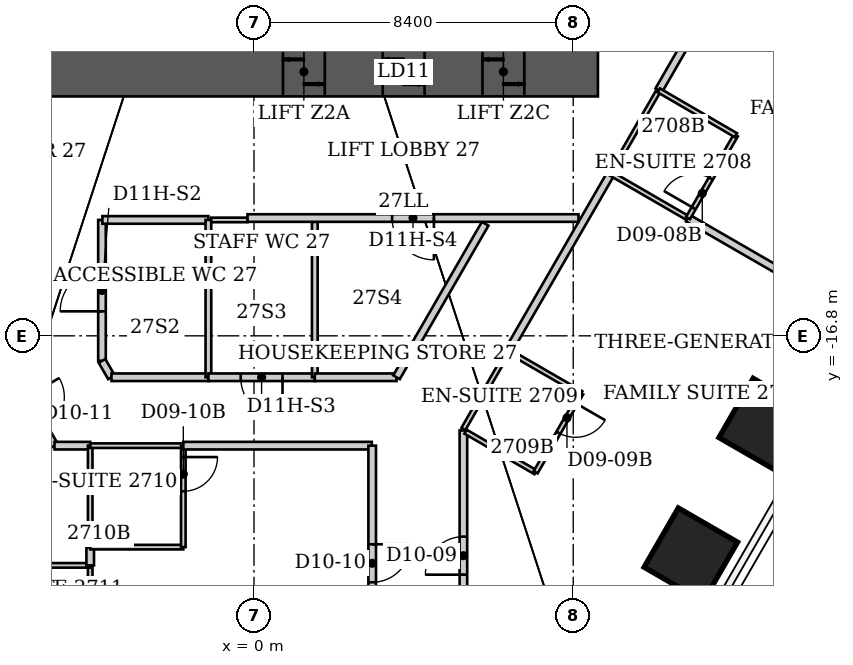
"""IFC4 building model, lengths in metres.
Left out: names, types, materials, properties, quantities, classifications, styles, units other than length and angle.
Written with IfcOpenShell. Run it as: python <this file> out.ifc"""

import sys

from ifc_helpers import new_model, si_unit, direction, frame, frame_2d, origin, origin_2d, place, context, subcontext, project, spatial, rectangle, extrude, element, fill, save


model = new_model("IFC4")
c1 = context("Model", 3, precision=1e-05, world=origin(), true_north=direction((0.0, 1.0)))
c2 = subcontext(c1, "Body", "Model", "MODEL_VIEW")
j1 = project(units=[si_unit("LENGTHUNIT", "METRE"), si_unit("PLANEANGLEUNIT", "RADIAN")], contexts=[c1])
p1 = place(None, origin())
s1 = spatial("IfcSite", under=j1, at=p1, CompositionType="ELEMENT")
p2 = place(p1, origin())
s2 = spatial("IfcBuilding", under=s1, at=p2, CompositionType="ELEMENT")
p3 = place(p2, frame((0.0, 0.0, 112.0)))
s3 = spatial("IfcBuildingStorey", under=s2, at=p3, CompositionType="ELEMENT", Elevation=112.0)
for number, where, z_axis, x_axis in (
    (1, (13.464, -19.147, 0.0), (0.0, 0.0, 1.0), (0.866, -0.5, 0.0)),
    (2, (11.494, -22.559, 0.0), (0.0, 0.0, 1.0), (0.866, -0.5, 0.0)),
):
    element("IfcColumn", number, at=place(p3, frame(where, z_axis=z_axis, x_axis=x_axis)), inside=s3, PredefinedType="COLUMN", context=c2, shape_type="SweptSolid", body=[
        extrude(rectangle(XDim=1.8, YDim=1.8, at=origin_2d()), origin(), (0.0, 0.0, 1.0), 3.8),
    ])
p4 = place(p3, frame((-9.05, -9.85, 0.0), z_axis=(0.0, 0.0, 1.0), x_axis=(1.0, 0.0, 0.0)))
e3 = element("IfcWall", 3, at=p4, inside=s3, PredefinedType="SHEAR", context=c2, shape_type="SweptSolid", body=[
    extrude(rectangle(XDim=18.1, YDim=1.3, at=frame_2d((9.05, 0.0))), origin(), (0.0, 0.0, 1.0), 3.8),
])
p5 = place(p4, frame((1.938, 0.0, 0.0)))
e4 = element("IfcOpeningElement", 4, at=p5, cuts=e3, PredefinedType="OPENING", context=c2, shape_type="SweptSolid", body=[
    extrude(rectangle(XDim=1.1, YDim=2.2, at=frame_2d((0.55, 1.1))), frame((0.0, 0.65, 0.0), z_axis=(0.0, -1.0, 0.0), x_axis=(1.0, 0.0, 0.0)), (0.0, 0.0, 1.0), 1.3),
])
p6 = place(p4, frame((9.812, 0.0, 0.0)))
e5 = element("IfcOpeningElement", 5, at=p6, cuts=e3, PredefinedType="OPENING", context=c2, shape_type="SweptSolid", body=[
    extrude(rectangle(XDim=1.1, YDim=2.1, at=frame_2d((0.55, 1.05))), frame((0.0, 0.65, 0.0), z_axis=(0.0, -1.0, 0.0), x_axis=(1.0, 0.0, 0.0)), (0.0, 0.0, 1.0), 1.3),
])
p7 = place(p4, frame((12.438, 0.0, 0.0)))
e6 = element("IfcOpeningElement", 6, at=p7, cuts=e3, PredefinedType="OPENING", context=c2, shape_type="SweptSolid", body=[
    extrude(rectangle(XDim=1.1, YDim=2.1, at=frame_2d((0.55, 1.05))), frame((0.0, 0.65, 0.0), z_axis=(0.0, -1.0, 0.0), x_axis=(1.0, 0.0, 0.0)), (0.0, 0.0, 1.0), 1.3),
])
p8 = place(p4, frame((15.062, 0.0, 0.0)))
e7 = element("IfcOpeningElement", 7, at=p8, cuts=e3, PredefinedType="OPENING", context=c2, shape_type="SweptSolid", body=[
    extrude(rectangle(XDim=1.1, YDim=2.1, at=frame_2d((0.55, 1.05))), frame((0.0, 0.65, 0.0), z_axis=(0.0, -1.0, 0.0), x_axis=(1.0, 0.0, 0.0)), (0.0, 0.0, 1.0), 1.3),
])
p9 = place(p3, frame((-6.23, -18.0, 0.0), z_axis=(0.0, 0.0, 1.0), x_axis=(0.501647016168, -0.86507240805, 0.0)))
e8 = element("IfcWall", 8, at=p9, inside=s3, PredefinedType="PARTITIONING", context=c2, shape_type="SweptSolid", body=[
    extrude(rectangle(XDim=1.954, YDim=0.2, at=frame_2d((0.977, 0.0))), origin(), (0.0, 0.0, 1.0), 3.64),
])
p10 = place(p9, frame((0.477, 0.0, 0.0)))
e9 = element("IfcOpeningElement", 9, at=p10, cuts=e8, PredefinedType="OPENING", context=c2, shape_type="SweptSolid", body=[
    extrude(rectangle(XDim=1.0, YDim=2.13, at=frame_2d((0.5, 1.065))), frame((0.0, 0.1, 0.0), z_axis=(0.0, -1.0, 0.0), x_axis=(1.0, 0.0, 0.0)), (0.0, 0.0, 1.0), 0.2),
])
p11 = place(p3, frame((-5.25, -19.69, 0.0), z_axis=(0.0, 0.0, 1.0), x_axis=(1.0, 0.0, 0.0)))
e10 = element("IfcWall", 10, at=p11, inside=s3, PredefinedType="PARTITIONING", context=c2, shape_type="SweptSolid", body=[
    extrude(rectangle(XDim=0.94, YDim=0.2, at=frame_2d((0.47, 0.0))), origin(), (0.0, 0.0, 1.0), 3.64),
])
p12 = place(p3, frame((-4.31, -24.84, 0.0), z_axis=(0.0, 0.0, 1.0), x_axis=(0.0, 1.0, 0.0)))
e11 = element("IfcWall", 11, at=p12, inside=s3, PredefinedType="PARTITIONING", context=c2, shape_type="SweptSolid", body=[
    extrude(rectangle(XDim=2.0, YDim=0.12, at=frame_2d((1.0, 0.0))), origin(), (0.0, 0.0, 1.0), 3.64),
])
p13 = place(p3, frame((-4.31, -22.84, 0.0), z_axis=(0.0, 0.0, 1.0), x_axis=(-1.0, 0.0, 0.0)))
e12 = element("IfcWall", 12, at=p13, inside=s3, PredefinedType="PARTITIONING", context=c2, shape_type="SweptSolid", body=[
    extrude(rectangle(XDim=2.4, YDim=0.12, at=frame_2d((1.2, 0.0))), origin(), (0.0, 0.0, 1.0), 3.64),
])
p14 = place(p3, frame((-4.31, -22.84, 0.0), z_axis=(0.0, 0.0, 1.0), x_axis=(0.0, 1.0, 0.0)))
e13 = element("IfcWall", 13, at=p14, inside=s3, PredefinedType="PARTITIONING", context=c2, shape_type="SweptSolid", body=[
    extrude(rectangle(XDim=0.48, YDim=0.2, at=frame_2d((0.24, 0.0))), origin(), (0.0, 0.0, 1.0), 3.64),
])
p15 = place(p3, frame((-4.31, -22.36, 0.0), z_axis=(0.0, 0.0, 1.0), x_axis=(0.0, 1.0, 0.0)))
e14 = element("IfcWall", 14, at=p15, inside=s3, PredefinedType="PARTITIONING", context=c2, shape_type="SweptSolid", body=[
    extrude(rectangle(XDim=2.67, YDim=0.12, at=frame_2d((1.335, 0.0))), origin(), (0.0, 0.0, 1.0), 3.64),
])
for number, where, z_axis, x_axis in (
    (15, (-4.31, -22.36, 0.0), (0.0, 0.0, 1.0), (1.0, 0.0, 0.0)),
    (16, (-4.31, -19.69, 0.0), (0.0, 0.0, 1.0), (1.0, 0.0, 0.0)),
):
    element("IfcWall", number, at=place(p3, frame(where, z_axis=z_axis, x_axis=x_axis)), inside=s3, PredefinedType="PARTITIONING", context=c2, shape_type="SweptSolid", body=[
        extrude(rectangle(XDim=2.45, YDim=0.12, at=frame_2d((1.225, 0.0))), origin(), (0.0, 0.0, 1.0), 3.64),
    ])
p16 = place(p3, frame((-4.0, -17.46, 0.0), z_axis=(0.0, 0.0, 1.0), x_axis=(0.0, 1.0, 0.0)))
e17 = element("IfcWall", 17, at=p16, inside=s3, PredefinedType="PARTITIONING", context=c2, shape_type="SweptSolid", body=[
    extrude(rectangle(XDim=3.71, YDim=0.2, at=frame_2d((1.855, 0.0))), origin(), (0.0, 0.0, 1.0), 2.878),
])
p17 = place(p16, frame((1.305, 0.0, 0.0)))
e18 = element("IfcOpeningElement", 18, at=p17, cuts=e17, PredefinedType="OPENING", context=c2, shape_type="SweptSolid", body=[
    extrude(rectangle(XDim=1.1, YDim=2.2, at=frame_2d((0.55, 1.1))), frame((0.0, 0.1, 0.0), z_axis=(0.0, -1.0, 0.0), x_axis=(1.0, 0.0, 0.0)), (0.0, 0.0, 1.0), 0.2),
])
p18 = place(p3, frame((-3.99, -13.75, 0.0), z_axis=(0.0, 0.0, 1.0), x_axis=(1.0, 0.0, 0.0)))
e19 = element("IfcWall", 19, at=p18, inside=s3, PredefinedType="PARTITIONING", context=c2, shape_type="SweptSolid", body=[
    extrude(rectangle(XDim=2.79, YDim=0.2, at=frame_2d((1.395, 0.0))), origin(), (0.0, 0.0, 1.0), 3.64),
])
p19 = place(p3, frame((-3.75, -17.89, 0.0), z_axis=(0.0, 0.0, 1.0), x_axis=(-0.502680181512, 0.864472460588, 0.0)))
e20 = element("IfcWall", 20, at=p19, inside=s3, PredefinedType="PARTITIONING", context=c2, shape_type="SweptSolid", body=[
    extrude(rectangle(XDim=0.497, YDim=0.2, at=frame_2d((0.249, 0.0))), origin(), (0.0, 0.0, 1.0), 3.64),
])
p20 = place(p3, frame((-1.86, -22.36, 0.0), z_axis=(0.0, 0.0, 1.0), x_axis=(0.0, 1.0, 0.0)))
e21 = element("IfcWall", 21, at=p20, inside=s3, PredefinedType="PARTITIONING", context=c2, shape_type="SweptSolid", body=[
    extrude(rectangle(XDim=2.67, YDim=0.12, at=frame_2d((1.335, 0.0))), origin(), (0.0, 0.0, 1.0), 2.86),
])
p21 = place(p20, frame((1.47, 0.0, 0.0)))
e22 = element("IfcOpeningElement", 22, at=p21, cuts=e21, PredefinedType="OPENING", context=c2, shape_type="SweptSolid", body=[
    extrude(rectangle(XDim=0.9, YDim=2.03, at=frame_2d((0.45, 1.015))), frame((0.0, 0.06, 0.0), z_axis=(0.0, -1.0, 0.0), x_axis=(1.0, 0.0, 0.0)), (0.0, 0.0, 1.0), 0.12),
])
p22 = place(p3, frame((-1.86, -19.69, 0.0), z_axis=(0.0, 0.0, 1.0), x_axis=(1.0, 0.0, 0.0)))
e23 = element("IfcWall", 23, at=p22, inside=s3, PredefinedType="PARTITIONING", context=c2, shape_type="SweptSolid", body=[
    extrude(rectangle(XDim=4.96, YDim=0.2, at=frame_2d((2.48, 0.0))), origin(), (0.0, 0.0, 1.0), 3.64),
])
p23 = place(p3, frame((-1.2, -17.89, 0.0), z_axis=(0.0, 0.0, 1.0), x_axis=(-1.0, 0.0, 0.0)))
e24 = element("IfcWall", 24, at=p23, inside=s3, PredefinedType="PARTITIONING", context=c2, shape_type="SweptSolid", body=[
    extrude(rectangle(XDim=2.55, YDim=0.2, at=frame_2d((1.275, 0.0))), origin(), (0.0, 0.0, 1.0), 3.64),
])
p24 = place(p3, frame((-1.2, -13.75, 0.0), z_axis=(0.0, 0.0, 1.0), x_axis=(0.0, -1.0, 0.0)))
e25 = element("IfcWall", 25, at=p24, inside=s3, PredefinedType="PARTITIONING", context=c2, shape_type="SweptSolid", body=[
    extrude(rectangle(XDim=4.14, YDim=0.15, at=frame_2d((2.07, 0.0))), origin(), (0.0, 0.0, 1.0), 3.64),
])
p25 = place(p3, frame((-1.125, -13.75, 0.0), z_axis=(0.0, 0.0, 1.0), x_axis=(1.0, 0.0, 0.0)))
e26 = element("IfcWall", 26, at=p25, inside=s3, PredefinedType="PARTITIONING", context=c2, shape_type="SweptSolid", body=[
    extrude(rectangle(XDim=0.955, YDim=0.12, at=frame_2d((0.478, 0.0))), origin(), (0.0, 0.0, 1.0), 3.64),
])
p26 = place(p3, frame((1.6, -17.89, 0.0), z_axis=(0.0, 0.0, 1.0), x_axis=(-1.0, 0.0, 0.0)))
e27 = element("IfcWall", 27, at=p26, inside=s3, PredefinedType="PARTITIONING", context=c2, shape_type="SweptSolid", body=[
    extrude(rectangle(XDim=2.8, YDim=0.2, at=frame_2d((1.4, 0.0))), origin(), (0.0, 0.0, 1.0), 3.64),
])
p27 = place(p26, frame((0.85, 0.0, 0.0)))
e28 = element("IfcOpeningElement", 28, at=p27, cuts=e27, PredefinedType="OPENING", context=c2, shape_type="SweptSolid", body=[
    extrude(rectangle(XDim=1.1, YDim=2.2, at=frame_2d((0.55, 1.1))), frame((0.0, 0.1, 0.0), z_axis=(0.0, -1.0, 0.0), x_axis=(1.0, 0.0, 0.0)), (0.0, 0.0, 1.0), 0.2),
])
p28 = place(p3, frame((1.6, -13.8, 0.0), z_axis=(0.0, 0.0, 1.0), x_axis=(0.0, -1.0, 0.0)))
e29 = element("IfcWall", 29, at=p28, inside=s3, PredefinedType="PARTITIONING", context=c2, shape_type="SweptSolid", body=[
    extrude(rectangle(XDim=4.09, YDim=0.15, at=frame_2d((2.045, 0.0))), origin(), (0.0, 0.0, 1.0), 3.64),
])
p29 = place(p3, frame((3.11, -19.69, 0.0), z_axis=(0.0, 0.0, 1.0), x_axis=(0.0, -1.0, 0.0)))
e30 = element("IfcWall", 30, at=p29, inside=s3, PredefinedType="PARTITIONING", context=c2, shape_type="SweptSolid", body=[
    extrude(rectangle(XDim=6.19, YDim=0.2, at=frame_2d((3.095, 0.0))), origin(), (0.0, 0.0, 1.0), 3.64),
])
p30 = place(p29, frame((2.595, 0.0, 0.0)))
e31 = element("IfcOpeningElement", 31, at=p30, cuts=e30, PredefinedType="OPENING", context=c2, shape_type="SweptSolid", body=[
    extrude(rectangle(XDim=1.0, YDim=2.13, at=frame_2d((0.5, 1.065))), frame((0.0, 0.1, 0.0), z_axis=(0.0, -1.0, 0.0), x_axis=(1.0, 0.0, 0.0)), (0.0, 0.0, 1.0), 0.2),
])
p31 = place(p3, frame((3.75, -17.89, 0.0), z_axis=(0.0, 0.0, 1.0), x_axis=(-1.0, 0.0, 0.0)))
e32 = element("IfcWall", 32, at=p31, inside=s3, PredefinedType="PARTITIONING", context=c2, shape_type="SweptSolid", body=[
    extrude(rectangle(XDim=2.15, YDim=0.2, at=frame_2d((1.075, 0.0))), origin(), (0.0, 0.0, 1.0), 3.64),
])
p32 = place(p3, frame((5.51, -25.88, 0.0), z_axis=(0.0, 0.0, 1.0), x_axis=(0.0, 1.0, 0.0)))
e33 = element("IfcWall", 33, at=p32, inside=s3, PredefinedType="PARTITIONING", context=c2, shape_type="SweptSolid", body=[
    extrude(rectangle(XDim=6.59, YDim=0.2, at=frame_2d((3.295, 0.0))), origin(), (0.0, 0.0, 1.0), 3.64),
])
p33 = place(p32, frame((2.795, 0.0, 0.0)))
e34 = element("IfcOpeningElement", 34, at=p33, cuts=e33, PredefinedType="OPENING", context=c2, shape_type="SweptSolid", body=[
    extrude(rectangle(XDim=1.0, YDim=2.13, at=frame_2d((0.5, 1.065))), frame((0.0, 0.1, 0.0), z_axis=(0.0, -1.0, 0.0), x_axis=(1.0, 0.0, 0.0)), (0.0, 0.0, 1.0), 0.2),
])
p34 = place(p3, frame((5.51, -19.25, 0.0), z_axis=(0.0, 0.0, 1.0), x_axis=(0.498837591974, 0.866695481028, 0.0)))
e35 = element("IfcWall", 35, at=p34, inside=s3, PredefinedType="PARTITIONING", context=c2, shape_type="SweptSolid", body=[
    extrude(rectangle(XDim=2.365, YDim=0.12, at=frame_2d((1.183, 0.0))), origin(), (0.0, 0.0, 1.0), 3.64),
])
p35 = place(p3, frame((5.566, -19.323, 0.0), z_axis=(0.0, 0.0, 1.0), x_axis=(0.865436746432, -0.501018201192, 0.0)))
e36 = element("IfcWall", 36, at=p35, inside=s3, PredefinedType="PARTITIONING", context=c2, shape_type="SweptSolid", body=[
    extrude(rectangle(XDim=2.13, YDim=0.12, at=frame_2d((1.065, 0.0))), origin(), (0.0, 0.0, 1.0), 3.64),
])
p36 = place(p3, frame((6.083, -13.85, 0.0), z_axis=(0.0, 0.0, 1.0), x_axis=(-0.499977643516, -0.866038310922, 0.0)))
e37 = element("IfcWall", 37, at=p36, inside=s3, PredefinedType="PARTITIONING", context=c2, shape_type="SweptSolid", body=[
    extrude(rectangle(XDim=4.665, YDim=0.2, at=frame_2d((2.333, 0.0))), origin(), (0.0, 0.0, 1.0), 3.64),
])
p37 = place(p3, frame((6.69, -17.2, 0.0), z_axis=(0.0, 0.0, 1.0), x_axis=(0.500524150216, 0.865722573952, 0.0)))
e38 = element("IfcWall", 38, at=p37, inside=s3, PredefinedType="PARTITIONING", context=c2, shape_type="SweptSolid", body=[
    extrude(rectangle(XDim=5.394, YDim=0.2, at=frame_2d((2.697, 0.0))), origin(), (0.0, 0.0, 1.0), 3.64),
])
p38 = place(p3, frame((7.41, -20.39, 0.0), z_axis=(0.0, 0.0, 1.0), x_axis=(0.499737123639, 0.866177122335, 0.0)))
e39 = element("IfcWall", 39, at=p38, inside=s3, PredefinedType="PARTITIONING", context=c2, shape_type="SweptSolid", body=[
    extrude(rectangle(XDim=2.401, YDim=0.12, at=frame_2d((1.201, 0.0))), origin(), (0.0, 0.0, 1.0), 3.64),
])
p39 = place(p38, frame((1.201, 0.0, 0.0)))
e40 = element("IfcOpeningElement", 40, at=p39, cuts=e39, PredefinedType="OPENING", context=c2, shape_type="SweptSolid", body=[
    extrude(rectangle(XDim=0.9, YDim=2.03, at=frame_2d((0.45, 1.015))), frame((0.0, 0.06, 0.0), z_axis=(0.0, -1.0, 0.0), x_axis=(1.0, 0.0, 0.0)), (0.0, 0.0, 1.0), 0.12),
])
p40 = place(p3, frame((8.538, -13.7, 0.0), z_axis=(0.0, 0.0, 1.0), x_axis=(-1.0, 0.0, 0.0)))
e41 = element("IfcWall", 41, at=p40, inside=s3, PredefinedType="PARTITIONING", context=c2, shape_type="SweptSolid", body=[
    extrude(rectangle(XDim=8.708, YDim=0.2, at=frame_2d((4.354, 0.0))), origin(), (0.0, 0.0, 1.0), 3.64),
])
p41 = place(p40, frame((3.804, 0.0, 0.0)))
e42 = element("IfcOpeningElement", 42, at=p41, cuts=e41, PredefinedType="OPENING", context=c2, shape_type="SweptSolid", body=[
    extrude(rectangle(XDim=1.1, YDim=2.2, at=frame_2d((0.55, 1.1))), frame((0.0, 0.1, 0.0), z_axis=(0.0, -1.0, 0.0), x_axis=(1.0, 0.0, 0.0)), (0.0, 0.0, 1.0), 0.2),
])
p42 = place(p3, frame((8.61, -18.31, 0.0), z_axis=(0.0, 0.0, 1.0), x_axis=(-0.865732595383, 0.500506816428, 0.0)))
e43 = element("IfcWall", 43, at=p42, inside=s3, PredefinedType="PARTITIONING", context=c2, shape_type="SweptSolid", body=[
    extrude(rectangle(XDim=2.218, YDim=0.12, at=frame_2d((1.109, 0.0))), origin(), (0.0, 0.0, 1.0), 3.64),
])
p43 = place(p3, frame((9.387, -12.528, 0.0), z_axis=(0.0, 0.0, 1.0), x_axis=(0.499797743474, 0.866142145158, 0.0)))
e44 = element("IfcWall", 44, at=p43, inside=s3, PredefinedType="PARTITIONING", context=c2, shape_type="SweptSolid", body=[
    extrude(rectangle(XDim=2.526, YDim=0.12, at=frame_2d((1.263, 0.0))), origin(), (0.0, 0.0, 1.0), 3.64),
])
p44 = place(p3, frame((9.39, -12.53, 0.0), z_axis=(0.0, 0.0, 1.0), x_axis=(0.865459574701, -0.500978766574, 0.0)))
e45 = element("IfcWall", 45, at=p44, inside=s3, PredefinedType="PARTITIONING", context=c2, shape_type="SweptSolid", body=[
    extrude(rectangle(XDim=2.343, YDim=0.12, at=frame_2d((1.171, 0.0))), origin(), (0.0, 0.0, 1.0), 3.64),
])
p45 = place(p3, frame((10.65, -10.34, 0.0), z_axis=(0.0, 0.0, 1.0), x_axis=(0.499990639951, 0.866030807744, 0.0)))
e46 = element("IfcWall", 46, at=p45, inside=s3, PredefinedType="PARTITIONING", context=c2, shape_type="SweptSolid", body=[
    extrude(rectangle(XDim=4.465, YDim=0.2, at=frame_2d((2.233, 0.0))), origin(), (0.0, 0.0, 1.0), 3.64),
])
p46 = place(p3, frame((11.418, -13.704, 0.0), z_axis=(0.0, 0.0, 1.0), x_axis=(0.866055675731, -0.499947563785, 0.0)))
e47 = element("IfcWall", 47, at=p46, inside=s3, PredefinedType="PARTITIONING", context=c2, shape_type="SweptSolid", body=[
    extrude(rectangle(XDim=5.633, YDim=0.2, at=frame_2d((2.816, 0.0))), origin(), (0.0, 0.0, 1.0), 3.64),
])
p47 = place(p3, frame((11.42, -13.7, 0.0), z_axis=(0.0, 0.0, 1.0), x_axis=(0.500424596343, 0.865780124151, 0.0)))
e48 = element("IfcWall", 48, at=p47, inside=s3, PredefinedType="PARTITIONING", context=c2, shape_type="SweptSolid", body=[
    extrude(rectangle(XDim=2.518, YDim=0.12, at=frame_2d((1.259, 0.0))), origin(), (0.0, 0.0, 1.0), 3.64),
])
p48 = place(p47, frame((0.3, 0.0, 0.0)))
e49 = element("IfcOpeningElement", 49, at=p48, cuts=e48, PredefinedType="OPENING", context=c2, shape_type="SweptSolid", body=[
    extrude(rectangle(XDim=0.9, YDim=2.03, at=frame_2d((0.45, 1.015))), frame((0.0, 0.06, 0.0), z_axis=(0.0, -1.0, 0.0), x_axis=(1.0, 0.0, 0.0)), (0.0, 0.0, 1.0), 0.12),
])
p49 = place(p3, frame((12.68, -11.52, 0.0), z_axis=(0.0, 0.0, 1.0), x_axis=(-0.864539759309, 0.502564428282, 0.0)))
e50 = element("IfcWall", 50, at=p49, inside=s3, PredefinedType="PARTITIONING", context=c2, shape_type="SweptSolid", body=[
    extrude(rectangle(XDim=2.348, YDim=0.12, at=frame_2d((1.174, 0.0))), origin(), (0.0, 0.0, 1.0), 3.64),
])
p50 = place(p3, frame((12.89, -6.46, 0.0), z_axis=(0.0, 0.0, 1.0), x_axis=(0.866181559118, -0.499729433437, 0.0)))
e51 = element("IfcWall", 51, at=p50, inside=s3, PredefinedType="PARTITIONING", context=c2, shape_type="SweptSolid", body=[
    extrude(rectangle(XDim=8.075, YDim=0.2, at=frame_2d((4.037, 0.0))), origin(), (0.0, 0.0, 1.0), 3.64),
])
p51 = place(p50, frame((3.537, 0.0, 0.0)))
e52 = element("IfcOpeningElement", 52, at=p51, cuts=e51, PredefinedType="OPENING", context=c2, shape_type="SweptSolid", body=[
    extrude(rectangle(XDim=1.0, YDim=2.13, at=frame_2d((0.5, 1.065))), frame((0.0, 0.1, 0.0), z_axis=(0.0, -1.0, 0.0), x_axis=(1.0, 0.0, 0.0)), (0.0, 0.0, 1.0), 0.2),
])
p52 = place(p48, origin())
e53 = element("IfcDoor", 53, at=p52, inside=s3, OperationType="SINGLE_SWING_LEFT", PredefinedType="DOOR", context=c2, shape_type="SweptSolid", body=[
    extrude(rectangle(XDim=0.9, YDim=2.03, at=frame_2d((0.45, 1.015))), frame((0.0, 0.025, 0.0), z_axis=(0.0, -1.0, 0.0), x_axis=(1.0, 0.0, 0.0)), (0.0, 0.0, 1.0), 0.05),
])
fill(e49, e53)
p53 = place(p33, origin())
e54 = element("IfcDoor", 54, at=p53, inside=s3, OperationType="SINGLE_SWING_LEFT", PredefinedType="DOOR", context=c2, shape_type="SweptSolid", body=[
    extrude(rectangle(XDim=1.0, YDim=2.13, at=frame_2d((0.5, 1.065))), frame((0.0, 0.025, 0.0), z_axis=(0.0, -1.0, 0.0), x_axis=(1.0, 0.0, 0.0)), (0.0, 0.0, 1.0), 0.05),
])
fill(e34, e54)
p54 = place(p39, origin())
e55 = element("IfcDoor", 55, at=p54, inside=s3, OperationType="SINGLE_SWING_RIGHT", PredefinedType="DOOR", context=c2, shape_type="SweptSolid", body=[
    extrude(rectangle(XDim=0.9, YDim=2.03, at=frame_2d((0.45, 1.015))), frame((0.0, 0.025, 0.0), z_axis=(0.0, -1.0, 0.0), x_axis=(1.0, 0.0, 0.0)), (0.0, 0.0, 1.0), 0.05),
])
fill(e40, e55)
p55 = place(p30, origin())
e56 = element("IfcDoor", 56, at=p55, inside=s3, OperationType="SINGLE_SWING_LEFT", PredefinedType="DOOR", context=c2, shape_type="SweptSolid", body=[
    extrude(rectangle(XDim=1.0, YDim=2.13, at=frame_2d((0.5, 1.065))), frame((0.0, 0.025, 0.0), z_axis=(0.0, -1.0, 0.0), x_axis=(1.0, 0.0, 0.0)), (0.0, 0.0, 1.0), 0.05),
])
fill(e31, e56)
p56 = place(p21, origin())
e57 = element("IfcDoor", 57, at=p56, inside=s3, OperationType="SINGLE_SWING_RIGHT", PredefinedType="DOOR", context=c2, shape_type="SweptSolid", body=[
    extrude(rectangle(XDim=0.9, YDim=2.03, at=frame_2d((0.45, 1.015))), frame((0.0, 0.025, 0.0), z_axis=(0.0, -1.0, 0.0), x_axis=(1.0, 0.0, 0.0)), (0.0, 0.0, 1.0), 0.05),
])
fill(e22, e57)
p57 = place(p17, origin())
e58 = element("IfcDoor", 58, at=p57, inside=s3, OperationType="SINGLE_SWING_LEFT", PredefinedType="DOOR", context=c2, shape_type="SweptSolid", body=[
    extrude(rectangle(XDim=1.1, YDim=2.2, at=frame_2d((0.55, 1.1))), frame((0.0, 0.025, 0.0), z_axis=(0.0, -1.0, 0.0), x_axis=(1.0, 0.0, 0.0)), (0.0, 0.0, 1.0), 0.05),
])
fill(e18, e58)
p58 = place(p27, origin())
e59 = element("IfcDoor", 59, at=p58, inside=s3, OperationType="SINGLE_SWING_LEFT", PredefinedType="DOOR", context=c2, shape_type="SweptSolid", body=[
    extrude(rectangle(XDim=1.1, YDim=2.2, at=frame_2d((0.55, 1.1))), frame((0.0, 0.025, 0.0), z_axis=(0.0, -1.0, 0.0), x_axis=(1.0, 0.0, 0.0)), (0.0, 0.0, 1.0), 0.05),
])
fill(e28, e59)
p59 = place(p41, origin())
e60 = element("IfcDoor", 60, at=p59, inside=s3, OperationType="SINGLE_SWING_LEFT", PredefinedType="DOOR", context=c2, shape_type="SweptSolid", body=[
    extrude(rectangle(XDim=1.1, YDim=2.2, at=frame_2d((0.55, 1.1))), frame((0.0, 0.025, 0.0), z_axis=(0.0, -1.0, 0.0), x_axis=(1.0, 0.0, 0.0)), (0.0, 0.0, 1.0), 0.05),
])
fill(e42, e60)
p60 = place(p6, origin())
e61 = element("IfcDoor", 61, at=p60, inside=s3, OperationType="DOUBLE_DOOR_SLIDING", PredefinedType="DOOR", context=c2, shape_type="SweptSolid", body=[
    extrude(rectangle(XDim=1.1, YDim=2.1, at=frame_2d((0.55, 1.05))), frame((0.0, 0.025, 0.0), z_axis=(0.0, -1.0, 0.0), x_axis=(1.0, 0.0, 0.0)), (0.0, 0.0, 1.0), 0.05),
])
fill(e5, e61)
p61 = place(p7, origin())
e62 = element("IfcDoor", 62, at=p61, inside=s3, OperationType="DOUBLE_DOOR_SLIDING", PredefinedType="DOOR", context=c2, shape_type="SweptSolid", body=[
    extrude(rectangle(XDim=1.1, YDim=2.1, at=frame_2d((0.55, 1.05))), frame((0.0, 0.025, 0.0), z_axis=(0.0, -1.0, 0.0), x_axis=(1.0, 0.0, 0.0)), (0.0, 0.0, 1.0), 0.05),
])
fill(e6, e62)
p62 = place(p8, origin())
e63 = element("IfcDoor", 63, at=p62, inside=s3, OperationType="DOUBLE_DOOR_SLIDING", PredefinedType="DOOR", context=c2, shape_type="SweptSolid", body=[
    extrude(rectangle(XDim=1.1, YDim=2.1, at=frame_2d((0.55, 1.05))), frame((0.0, 0.025, 0.0), z_axis=(0.0, -1.0, 0.0), x_axis=(1.0, 0.0, 0.0)), (0.0, 0.0, 1.0), 0.05),
])
fill(e7, e63)
save(model, sys.argv[1])
